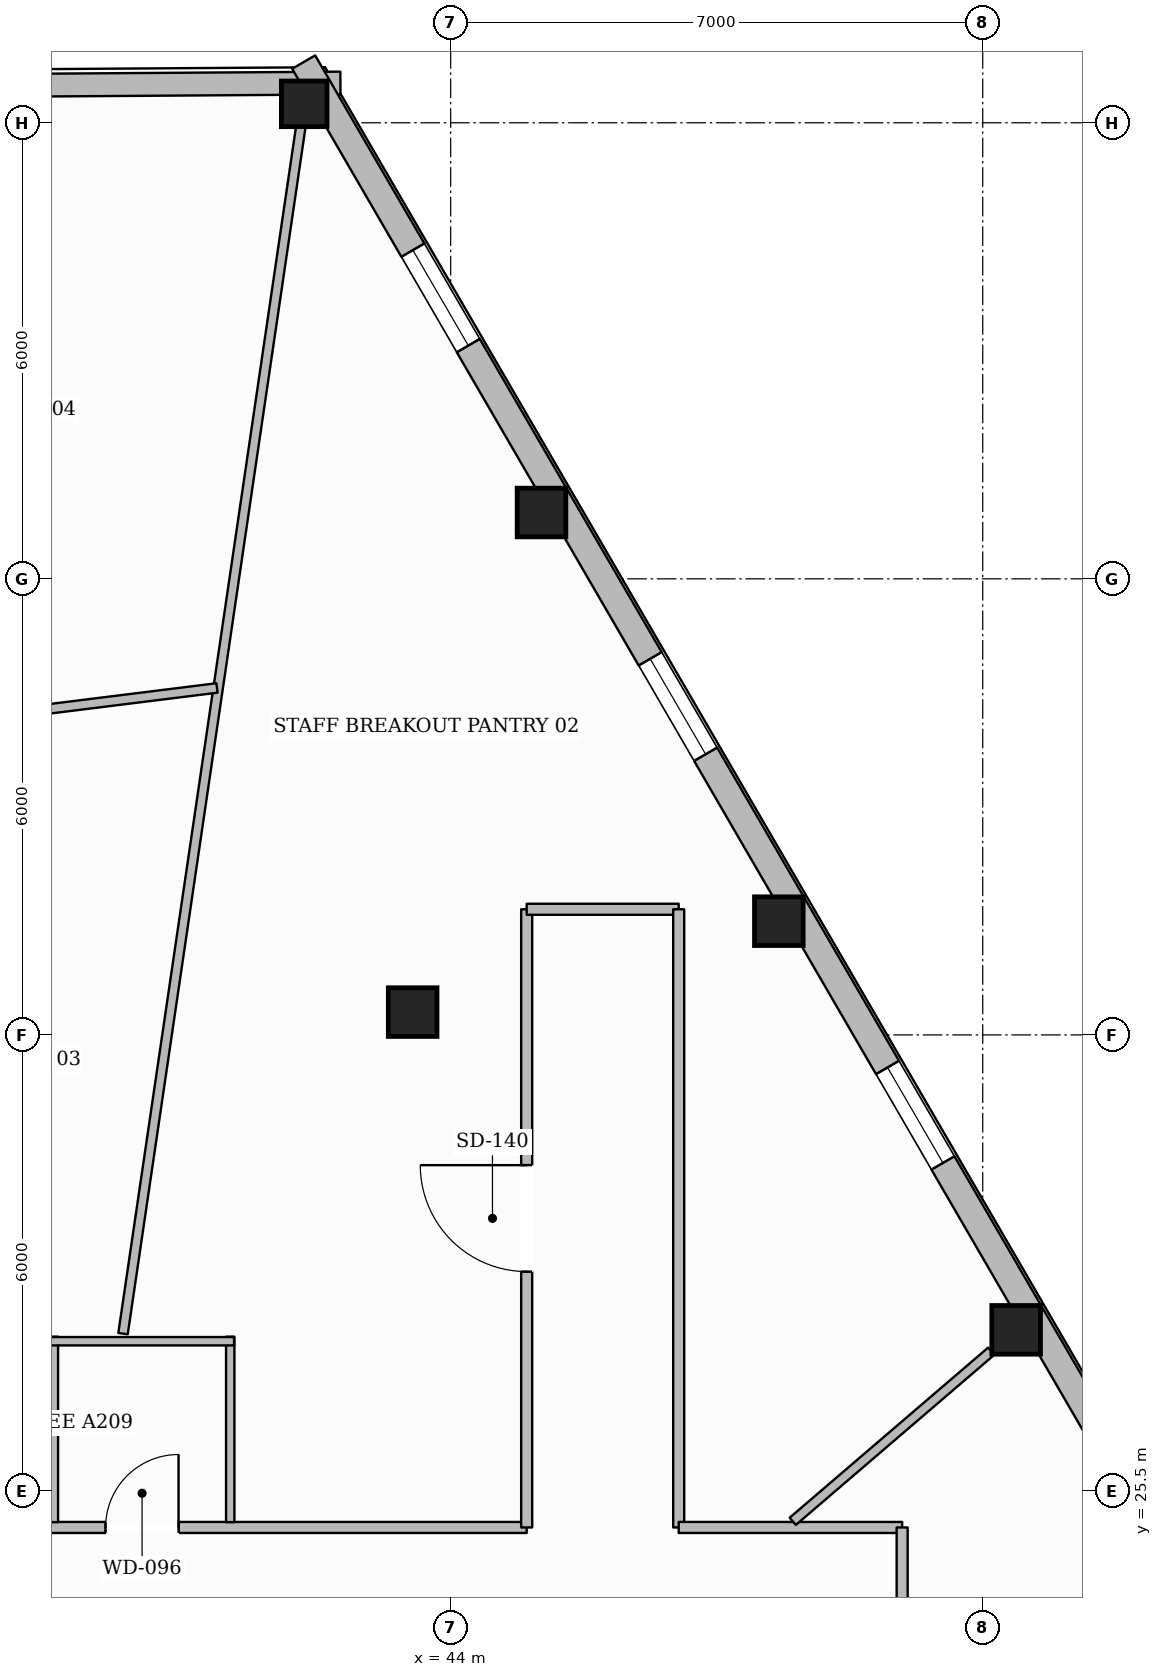
"""IFC4 building model, lengths in metres.
Left out: names, types, materials, properties, quantities, classifications, styles, units other than length and angle.
Written with IfcOpenShell. Run it as: python <this file> out.ifc"""

import sys

from ifc_helpers import new_model, si_unit, direction, frame, frame_2d, origin, origin_2d, place, context, subcontext, project, spatial, rectangle, hollow_rectangle, extrude, element, fill, save


model = new_model("IFC4")
c1 = context("Model", 3, precision=1e-05, world=origin(), true_north=direction((0.0, 1.0)))
c2 = subcontext(c1, "Body", "Model", "MODEL_VIEW")
j1 = project(units=[si_unit("LENGTHUNIT", "METRE"), si_unit("PLANEANGLEUNIT", "RADIAN")], contexts=[c1])
p1 = place(None, origin())
s1 = spatial("IfcSite", under=j1, at=p1, CompositionType="ELEMENT")
p2 = place(p1, origin())
s2 = spatial("IfcBuilding", under=s1, at=p2, CompositionType="ELEMENT")
p3 = place(p2, frame((0.0, 0.0, 211.2)))
s3 = spatial("IfcBuildingStorey", under=s2, at=p3, CompositionType="ELEMENT", Elevation=211.2)
for number, where, z_axis, x_axis in (
    (1, (51.44, 27.62, 0.0), (0.0, 0.0, 1.0), (1.0, 0.0, 0.0)),
    (2, (48.317, 32.996, 0.0), (0.0, 0.0, 1.0), (1.0, 0.0, 0.0)),
    (3, (45.195, 38.373, 0.0), (0.0, 0.0, 1.0), (1.0, 0.0, 0.0)),
):
    element("IfcColumn", number, at=place(p3, frame(where, z_axis=z_axis, x_axis=x_axis)), inside=s3, PredefinedType="COLUMN", context=c2, shape_type="SweptSolid", body=[
        extrude(hollow_rectangle(XDim=0.64, YDim=0.64, WallThickness=0.028, at=origin_2d()), origin(), (0.0, 0.0, 1.0), 3.6),
    ])
p4 = place(p3, frame((42.073, 43.749, 0.0), z_axis=(0.0, 0.0, 1.0), x_axis=(1.0, 0.0, 0.0)))
e4 = element("IfcColumn", 4, at=p4, inside=s3, PredefinedType="COLUMN", context=c2, shape_type="SweptSolid", body=[
    extrude(hollow_rectangle(XDim=0.6, YDim=0.6, WallThickness=0.028, at=origin_2d()), origin(), (0.0, 0.0, 1.0), 3.6),
])
p5 = place(p3, frame((43.5, 31.8, 0.0), z_axis=(0.0, 0.0, 1.0), x_axis=(1.0, 0.0, 0.0)))
e5 = element("IfcColumn", 5, at=p5, inside=s3, PredefinedType="COLUMN", context=c2, shape_type="SweptSolid", body=[
    extrude(hollow_rectangle(XDim=0.64, YDim=0.64, WallThickness=0.028, at=origin_2d()), origin(), (0.0, 0.0, 1.0), 3.6),
])
p6 = place(p3, frame((33.35, 43.96, 0.0), z_axis=(0.0, 0.0, 1.0), x_axis=(0.99997674426, 0.006819892877, 0.0)))
e6 = element("IfcWall", 6, at=p6, inside=s3, PredefinedType="STANDARD", context=c2, shape_type="SweptSolid", body=[
    extrude(rectangle(XDim=9.2, YDim=0.3, at=frame_2d((4.6, 0.0))), origin(), (0.0, 0.0, 1.0), 3.132),
])
p7 = place(p6, frame((4.075, 0.0, 0.65)))
e7 = element("IfcOpeningElement", 7, at=p7, cuts=e6, PredefinedType="OPENING", context=c2, shape_type="SweptSolid", body=[
    extrude(rectangle(XDim=1.05, YDim=1.7, at=frame_2d((0.525, 0.85))), frame((0.0, 0.16, 0.0), z_axis=(0.0, -1.0, 0.0), x_axis=(1.0, 0.0, 0.0)), (0.0, 0.0, 1.0), 0.32),
])
p8 = place(p3, frame((42.066, 44.299, 0.0), z_axis=(0.0, 0.0, 1.0), x_axis=(0.502188775534, -0.864758020331, 0.0)))
e8 = element("IfcWall", 8, at=p8, inside=s3, PredefinedType="STANDARD", context=c2, shape_type="SweptSolid", body=[
    extrude(rectangle(XDim=38.263, YDim=0.35, at=frame_2d((19.132, 0.0))), origin(), (0.0, 0.0, 1.0), 3.132),
])
p9 = place(p8, frame((33.948, 0.0, 0.65)))
e9 = element("IfcOpeningElement", 9, at=p9, cuts=e8, PredefinedType="OPENING", context=c2, shape_type="SweptSolid", body=[
    extrude(rectangle(XDim=1.45, YDim=1.75, at=frame_2d((0.725, 0.875))), frame((0.0, 0.185, 0.0), z_axis=(0.0, -1.0, 0.0), x_axis=(1.0, 0.0, 0.0)), (0.0, 0.0, 1.0), 0.37),
])
p10 = place(p8, frame((27.731, 0.0, 0.65)))
e10 = element("IfcOpeningElement", 10, at=p10, cuts=e8, PredefinedType="OPENING", context=c2, shape_type="SweptSolid", body=[
    extrude(rectangle(XDim=1.45, YDim=1.75, at=frame_2d((0.725, 0.875))), frame((0.0, 0.185, 0.0), z_axis=(0.0, -1.0, 0.0), x_axis=(1.0, 0.0, 0.0)), (0.0, 0.0, 1.0), 0.37),
])
p11 = place(p8, frame((15.297, 0.0, 0.65)))
e11 = element("IfcOpeningElement", 11, at=p11, cuts=e8, PredefinedType="OPENING", context=c2, shape_type="SweptSolid", body=[
    extrude(rectangle(XDim=1.45, YDim=1.75, at=frame_2d((0.725, 0.875))), frame((0.0, 0.185, 0.0), z_axis=(0.0, -1.0, 0.0), x_axis=(1.0, 0.0, 0.0)), (0.0, 0.0, 1.0), 0.37),
])
p12 = place(p8, frame((9.079, 0.0, 0.65)))
e12 = element("IfcOpeningElement", 12, at=p12, cuts=e8, PredefinedType="OPENING", context=c2, shape_type="SweptSolid", body=[
    extrude(rectangle(XDim=1.45, YDim=1.75, at=frame_2d((0.725, 0.875))), frame((0.0, 0.185, 0.0), z_axis=(0.0, -1.0, 0.0), x_axis=(1.0, 0.0, 0.0)), (0.0, 0.0, 1.0), 0.37),
])
p13 = place(p8, frame((2.862, 0.0, 0.65)))
e13 = element("IfcOpeningElement", 13, at=p13, cuts=e8, PredefinedType="OPENING", context=c2, shape_type="SweptSolid", body=[
    extrude(rectangle(XDim=1.45, YDim=1.75, at=frame_2d((0.725, 0.875))), frame((0.0, 0.185, 0.0), z_axis=(0.0, -1.0, 0.0), x_axis=(1.0, 0.0, 0.0)), (0.0, 0.0, 1.0), 0.37),
])
p14 = place(p3, frame((31.0, 25.02, 0.0), z_axis=(0.0, 0.0, 1.0), x_axis=(1.0, 0.0, 0.0)))
e14 = element("IfcWall", 14, at=p14, inside=s3, PredefinedType="PARTITIONING", context=c2, shape_type="SweptSolid", body=[
    extrude(rectangle(XDim=14.0, YDim=0.145, at=frame_2d((7.0, 0.0))), origin(), (0.0, 0.0, 1.0), 3.6),
])
p15 = place(p14, frame((3.56, 0.0, 0.0)))
e15 = element("IfcOpeningElement", 15, at=p15, cuts=e14, PredefinedType="OPENING", context=c2, shape_type="SweptSolid", body=[
    extrude(rectangle(XDim=0.88, YDim=2.1, at=frame_2d((0.44, 1.05))), frame((0.0, 0.083, 0.0), z_axis=(0.0, -1.0, 0.0), x_axis=(1.0, 0.0, 0.0)), (0.0, 0.0, 1.0), 0.165),
])
p16 = place(p14, frame((6.08, 0.0, 0.0)))
e16 = element("IfcOpeningElement", 16, at=p16, cuts=e14, PredefinedType="OPENING", context=c2, shape_type="SweptSolid", body=[
    extrude(rectangle(XDim=0.88, YDim=2.1, at=frame_2d((0.44, 1.05))), frame((0.0, 0.083, 0.0), z_axis=(0.0, -1.0, 0.0), x_axis=(1.0, 0.0, 0.0)), (0.0, 0.0, 1.0), 0.165),
])
p17 = place(p14, frame((8.46, 0.0, 0.0)))
e17 = element("IfcOpeningElement", 17, at=p17, cuts=e14, PredefinedType="OPENING", context=c2, shape_type="SweptSolid", body=[
    extrude(rectangle(XDim=0.96, YDim=2.1, at=frame_2d((0.48, 1.05))), frame((0.0, 0.083, 0.0), z_axis=(0.0, -1.0, 0.0), x_axis=(1.0, 0.0, 0.0)), (0.0, 0.0, 1.0), 0.165),
])
p18 = place(p3, frame((45.0, 25.02, 0.0), z_axis=(0.0, 0.0, 1.0), x_axis=(0.0, 1.0, 0.0)))
e18 = element("IfcWall", 18, at=p18, inside=s3, PredefinedType="PARTITIONING", context=c2, shape_type="SweptSolid", body=[
    extrude(rectangle(XDim=8.133, YDim=0.145, at=frame_2d((4.066, 0.0))), origin(), (0.0, 0.0, 1.0), 3.141),
])
p19 = place(p18, frame((3.366, 0.0, 0.0)))
e19 = element("IfcOpeningElement", 19, at=p19, cuts=e18, PredefinedType="OPENING", context=c2, shape_type="SweptSolid", body=[
    extrude(rectangle(XDim=1.4, YDim=2.2, at=frame_2d((0.7, 1.1))), frame((0.0, 0.083, 0.0), z_axis=(0.0, -1.0, 0.0), x_axis=(1.0, 0.0, 0.0)), (0.0, 0.0, 1.0), 0.165),
])
p20 = place(p3, frame((45.0, 33.153, 0.0), z_axis=(0.0, 0.0, 1.0), x_axis=(1.0, 0.0, 0.0)))
e20 = element("IfcWall", 20, at=p20, inside=s3, PredefinedType="PARTITIONING", context=c2, shape_type="SweptSolid", body=[
    extrude(rectangle(XDim=2.0, YDim=0.145, at=frame_2d((1.0, 0.0))), origin(), (0.0, 0.0, 1.0), 3.6),
])
p21 = place(p3, frame((47.0, 33.153, 0.0), z_axis=(0.0, 0.0, 1.0), x_axis=(0.0, -1.0, 0.0)))
e21 = element("IfcWall", 21, at=p21, inside=s3, PredefinedType="PARTITIONING", context=c2, shape_type="SweptSolid", body=[
    extrude(rectangle(XDim=8.133, YDim=0.145, at=frame_2d((4.066, 0.0))), origin(), (0.0, 0.0, 1.0), 3.6),
])
p22 = place(p3, frame((47.0, 25.02, 0.0), z_axis=(0.0, 0.0, 1.0), x_axis=(1.0, 0.0, 0.0)))
e22 = element("IfcWall", 22, at=p22, inside=s3, PredefinedType="PARTITIONING", context=c2, shape_type="SweptSolid", body=[
    extrude(rectangle(XDim=2.94, YDim=0.145, at=frame_2d((1.47, 0.0))), origin(), (0.0, 0.0, 1.0), 3.6),
])
p23 = place(p3, frame((49.94, 25.02, 0.0), z_axis=(0.0, 0.0, 1.0), x_axis=(0.0, -1.0, 0.0)))
e23 = element("IfcWall", 23, at=p23, inside=s3, PredefinedType="PARTITIONING", context=c2, shape_type="SweptSolid", body=[
    extrude(rectangle(XDim=7.92, YDim=0.145, at=frame_2d((3.96, 0.0))), origin(), (0.0, 0.0, 1.0), 3.339),
])
p24 = place(p23, frame((1.626, 0.0, 0.0)))
e24 = element("IfcOpeningElement", 24, at=p24, cuts=e23, PredefinedType="OPENING", context=c2, shape_type="SweptSolid", body=[
    extrude(rectangle(XDim=0.98, YDim=2.15, at=frame_2d((0.49, 1.075))), frame((0.0, 0.083, 0.0), z_axis=(0.0, -1.0, 0.0), x_axis=(1.0, 0.0, 0.0)), (0.0, 0.0, 1.0), 0.165),
])
for number, where, z_axis, x_axis in (
    (25, (38.78, 25.09, 0.0), (0.0, 0.0, 1.0), (0.0, 1.0, 0.0)),
    (26, (41.1, 25.09, 0.0), (0.0, 0.0, 1.0), (0.0, 1.0, 0.0)),
):
    element("IfcWall", number, at=place(p3, frame(where, z_axis=z_axis, x_axis=x_axis)), inside=s3, PredefinedType="PLUMBINGWALL", context=c2, shape_type="SweptSolid", body=[
        extrude(rectangle(XDim=2.44, YDim=0.11, at=frame_2d((1.22, 0.0))), origin(), (0.0, 0.0, 1.0), 3.6),
    ])
p25 = place(p3, frame((33.69, 27.47, 0.0), z_axis=(0.0, 0.0, 1.0), x_axis=(1.0, 0.0, 0.0)))
e27 = element("IfcWall", 27, at=p25, inside=s3, PredefinedType="PLUMBINGWALL", context=c2, shape_type="SweptSolid", body=[
    extrude(rectangle(XDim=7.46, YDim=0.11, at=frame_2d((3.73, 0.0))), origin(), (0.0, 0.0, 1.0), 3.6),
])
p26 = place(p3, frame((48.5, 25.101, 0.0), z_axis=(0.0, 0.0, 1.0), x_axis=(0.759291677872, 0.650750449799, 0.0)))
e28 = element("IfcWall", 28, at=p26, inside=s3, PredefinedType="PARTITIONING", context=c2, shape_type="SweptSolid", body=[
    extrude(rectangle(XDim=3.439, YDim=0.125, at=frame_2d((1.72, 0.0))), origin(), (0.0, 0.0, 1.0), 3.141),
])
p27 = place(p3, frame((39.69, 27.57, 0.0), z_axis=(0.0, 0.0, 1.0), x_axis=(0.145732327781, 0.989324056434, 0.0)))
e29 = element("IfcWall", 29, at=p27, inside=s3, PredefinedType="PARTITIONING", context=c2, shape_type="SweptSolid", body=[
    extrude(rectangle(XDim=16.042, YDim=0.125, at=frame_2d((8.021, 0.0))), origin(), (0.0, 0.0, 1.0), 3.141),
])
p28 = place(p3, frame((40.926, 36.064, 0.0), z_axis=(0.0, 0.0, 1.0), x_axis=(-0.992323981917, -0.123665334316, 0.0)))
e30 = element("IfcWall", 30, at=p28, inside=s3, PredefinedType="PARTITIONING", context=c2, shape_type="SweptSolid", body=[
    extrude(rectangle(XDim=12.771, YDim=0.125, at=frame_2d((6.386, 0.0))), origin(), (0.0, 0.0, 1.0), 3.6),
])
p29 = place(p28, frame((6.003, 0.0, 0.0)))
e31 = element("IfcOpeningElement", 31, at=p29, cuts=e30, PredefinedType="OPENING", context=c2, shape_type="SweptSolid", body=[
    extrude(rectangle(XDim=0.98, YDim=2.15, at=frame_2d((0.49, 1.075))), frame((0.0, 0.073, 0.0), z_axis=(0.0, -1.0, 0.0), x_axis=(1.0, 0.0, 0.0)), (0.0, 0.0, 1.0), 0.145),
])
p30 = place(p11, origin())
e32 = element("IfcWindow", 32, at=p30, inside=s3, PartitioningType="SINGLE_PANEL", PredefinedType="WINDOW", context=c2, shape_type="SweptSolid", body=[
    extrude(rectangle(XDim=1.45, YDim=1.75, at=frame_2d((0.725, 0.875))), frame((0.0, 0.03, 0.0), z_axis=(0.0, -1.0, 0.0), x_axis=(1.0, 0.0, 0.0)), (0.0, 0.0, 1.0), 0.06),
])
fill(e11, e32)
p31 = place(p12, origin())
e33 = element("IfcWindow", 33, at=p31, inside=s3, PartitioningType="SINGLE_PANEL", PredefinedType="WINDOW", context=c2, shape_type="SweptSolid", body=[
    extrude(rectangle(XDim=1.45, YDim=1.75, at=frame_2d((0.725, 0.875))), frame((0.0, 0.03, 0.0), z_axis=(0.0, -1.0, 0.0), x_axis=(1.0, 0.0, 0.0)), (0.0, 0.0, 1.0), 0.06),
])
fill(e12, e33)
p32 = place(p13, origin())
e34 = element("IfcWindow", 34, at=p32, inside=s3, PartitioningType="SINGLE_PANEL", PredefinedType="WINDOW", context=c2, shape_type="SweptSolid", body=[
    extrude(rectangle(XDim=1.45, YDim=1.75, at=frame_2d((0.725, 0.875))), frame((0.0, 0.03, 0.0), z_axis=(0.0, -1.0, 0.0), x_axis=(1.0, 0.0, 0.0)), (0.0, 0.0, 1.0), 0.06),
])
fill(e13, e34)
p33 = place(p17, origin())
e35 = element("IfcDoor", 35, at=p33, inside=s3, OperationType="SINGLE_SWING_RIGHT", PredefinedType="DOOR", context=c2, shape_type="SweptSolid", body=[
    extrude(rectangle(XDim=0.96, YDim=2.1, at=frame_2d((0.48, 1.05))), frame((0.0, 0.025, 0.0), z_axis=(0.0, -1.0, 0.0), x_axis=(1.0, 0.0, 0.0)), (0.0, 0.0, 1.0), 0.05),
])
fill(e17, e35)
p34 = place(p19, origin())
e36 = element("IfcDoor", 36, at=p34, inside=s3, OperationType="SINGLE_SWING_RIGHT", PredefinedType="DOOR", context=c2, shape_type="SweptSolid", body=[
    extrude(rectangle(XDim=1.4, YDim=2.2, at=frame_2d((0.7, 1.1))), frame((0.0, 0.025, 0.0), z_axis=(0.0, -1.0, 0.0), x_axis=(1.0, 0.0, 0.0)), (0.0, 0.0, 1.0), 0.05),
])
fill(e19, e36)
save(model, sys.argv[1])
